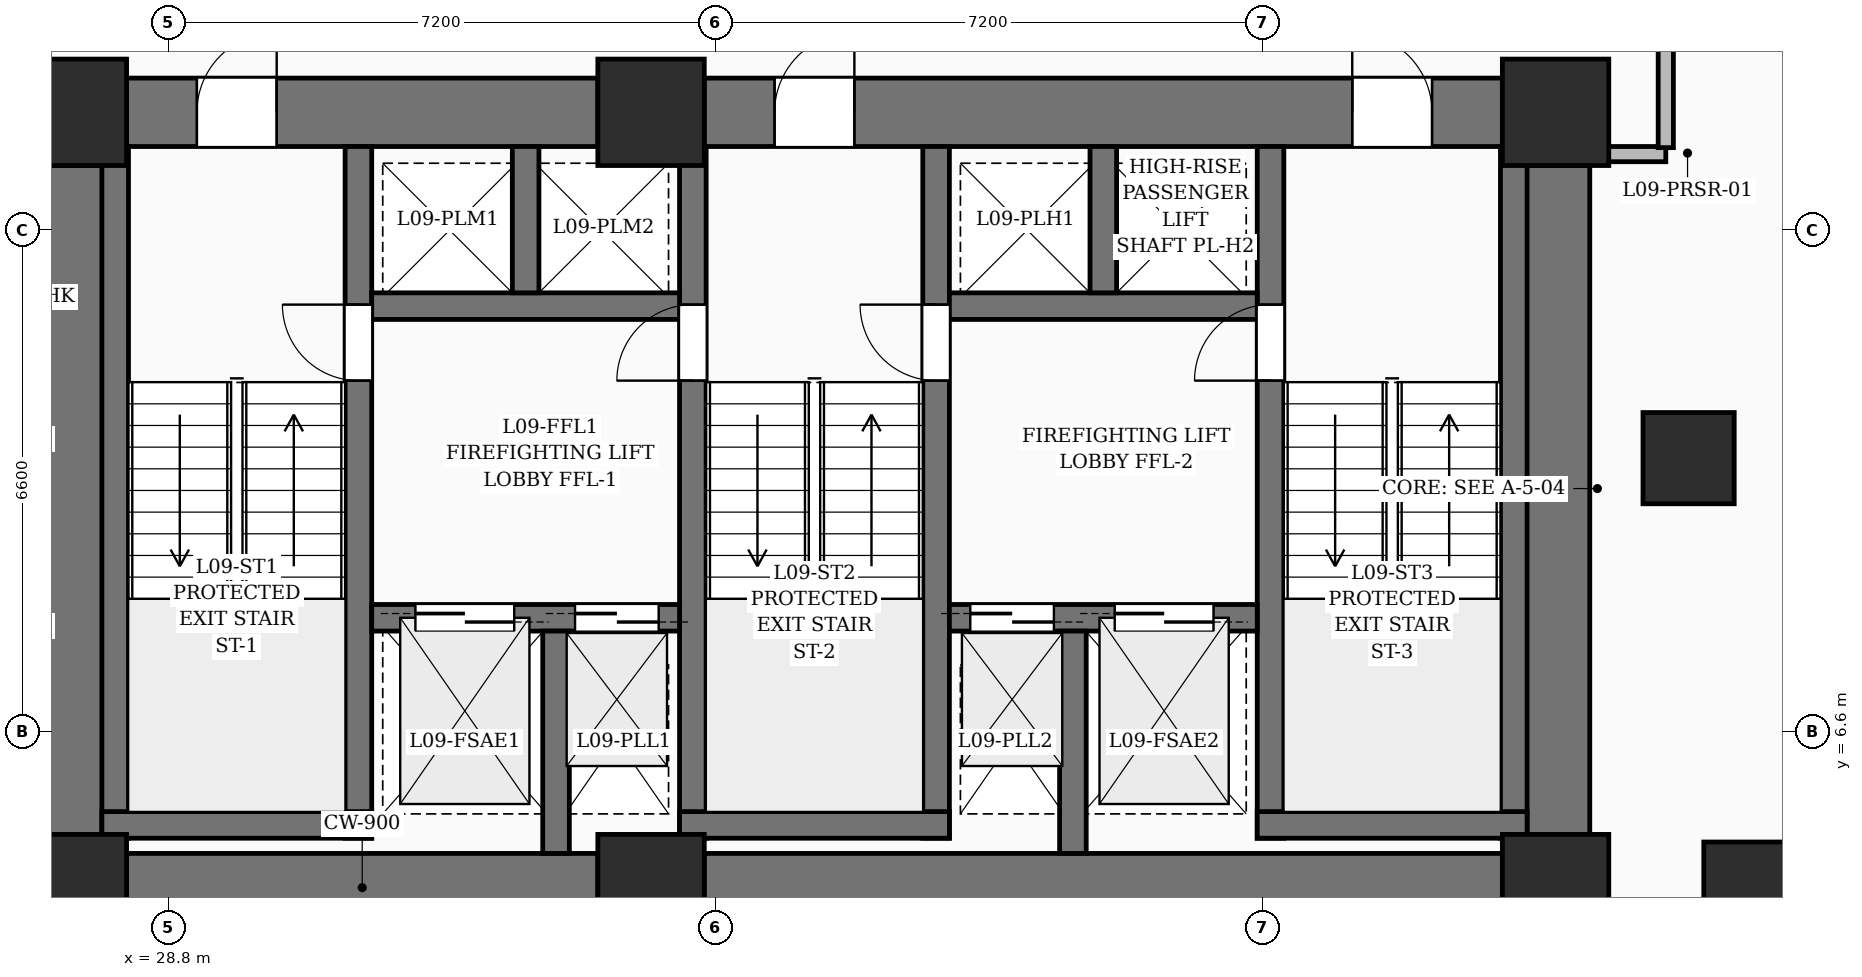
"""IFC4 building model, lengths in metres.
Left out: names, types, materials, properties, quantities, classifications, styles, units other than length and angle.
Written with IfcOpenShell. Run it as: python <this file> out.ifc"""

import sys

from ifc_helpers import new_model, si_unit, direction, frame, frame_2d, origin, origin_2d, place, context, subcontext, project, spatial, rectangle, extrude, element, fill, save


model = new_model("IFC4")
c1 = context("Model", 3, precision=1e-05, world=origin(), true_north=direction((0.0, 1.0)))
c2 = subcontext(c1, "Body", "Model", "MODEL_VIEW")
j1 = project(units=[si_unit("LENGTHUNIT", "METRE"), si_unit("PLANEANGLEUNIT", "RADIAN")], contexts=[c1])
p1 = place(None, origin())
s1 = spatial("IfcSite", under=j1, at=p1, CompositionType="ELEMENT")
p2 = place(p1, origin())
s2 = spatial("IfcBuilding", under=s1, at=p2, CompositionType="ELEMENT")
p3 = place(p2, frame((0.0, 0.0, 42.6)))
s3 = spatial("IfcBuildingStorey", under=s2, at=p3, CompositionType="ELEMENT", Elevation=42.6)
for number, where, z_axis, x_axis in (
    (1, (27.55, 4.55, 0.0), (0.0, 0.0, 1.0), (1.0, 0.0, 0.0)),
    (2, (35.15, 4.55, 0.0), (0.0, 0.0, 1.0), (1.0, 0.0, 0.0)),
    (3, (47.05, 4.55, 0.0), (0.0, 0.0, 1.0), (1.0, 0.0, 0.0)),
    (4, (27.55, 14.75, 0.0), (0.0, 0.0, 1.0), (1.0, 0.0, 0.0)),
    (5, (35.15, 14.75, 0.0), (0.0, 0.0, 1.0), (1.0, 0.0, 0.0)),
    (6, (47.05, 14.75, 0.0), (0.0, 0.0, 1.0), (1.0, 0.0, 0.0)),
):
    element("IfcColumn", number, at=place(p3, frame(where, z_axis=z_axis, x_axis=x_axis)), inside=s3, PredefinedType="COLUMN", context=c2, shape_type="SweptSolid", body=[
        extrude(rectangle(XDim=1.4, YDim=1.4, at=origin_2d()), origin(), (0.0, 0.0, 1.0), 3.6),
    ])
for number, where, z_axis, x_axis in (
    (7, (49.6, 4.55, 0.0), (0.0, 0.0, 1.0), (1.0, 0.0, 0.0)),
    (8, (48.8, 10.2, 0.0), (0.0, 0.0, 1.0), (1.0, 0.0, 0.0)),
):
    element("IfcColumn", number, at=place(p3, frame(where, z_axis=z_axis, x_axis=x_axis)), inside=s3, PredefinedType="COLUMN", context=c2, shape_type="SweptSolid", body=[
        extrude(rectangle(XDim=1.2, YDim=1.2, at=origin_2d()), origin(), (0.0, 0.0, 1.0), 3.6),
    ])
p4 = place(p3, frame((28.25, 4.55, 0.0), z_axis=(0.0, 0.0, 1.0), x_axis=(1.0, 0.0, 0.0)))
e9 = element("IfcWall", 9, at=p4, inside=s3, PredefinedType="SHEAR", context=c2, shape_type="SweptSolid", body=[
    extrude(rectangle(XDim=6.2, YDim=0.9, at=frame_2d((3.1, 0.0))), origin(), (0.0, 0.0, 1.0), 3.6),
])
p5 = place(p3, frame((35.85, 4.55, 0.0), z_axis=(0.0, 0.0, 1.0), x_axis=(1.0, 0.0, 0.0)))
e10 = element("IfcWall", 10, at=p5, inside=s3, PredefinedType="SHEAR", context=c2, shape_type="SweptSolid", body=[
    extrude(rectangle(XDim=10.5, YDim=0.9, at=frame_2d((5.25, 0.0))), origin(), (0.0, 0.0, 1.0), 3.6),
])
p6 = place(p3, frame((28.25, 14.75, 0.0), z_axis=(0.0, 0.0, 1.0), x_axis=(1.0, 0.0, 0.0)))
e11 = element("IfcWall", 11, at=p6, inside=s3, PredefinedType="SHEAR", context=c2, shape_type="SweptSolid", body=[
    extrude(rectangle(XDim=6.2, YDim=0.9, at=frame_2d((3.1, 0.0))), origin(), (0.0, 0.0, 1.0), 3.6),
])
p7 = place(p6, frame((0.925, 0.0, 0.0)))
e12 = element("IfcOpeningElement", 12, at=p7, cuts=e11, PredefinedType="OPENING", context=c2, shape_type="SweptSolid", body=[
    extrude(rectangle(XDim=1.05, YDim=2.15, at=frame_2d((0.525, 1.075))), frame((0.0, 0.46, 0.0), z_axis=(0.0, -1.0, 0.0), x_axis=(1.0, 0.0, 0.0)), (0.0, 0.0, 1.0), 0.92),
])
p8 = place(p3, frame((35.85, 14.75, 0.0), z_axis=(0.0, 0.0, 1.0), x_axis=(1.0, 0.0, 0.0)))
e13 = element("IfcWall", 13, at=p8, inside=s3, PredefinedType="SHEAR", context=c2, shape_type="SweptSolid", body=[
    extrude(rectangle(XDim=10.5, YDim=0.9, at=frame_2d((5.25, 0.0))), origin(), (0.0, 0.0, 1.0), 3.6),
])
p9 = place(p8, frame((0.925, 0.0, 0.0)))
e14 = element("IfcOpeningElement", 14, at=p9, cuts=e13, PredefinedType="OPENING", context=c2, shape_type="SweptSolid", body=[
    extrude(rectangle(XDim=1.05, YDim=2.15, at=frame_2d((0.525, 1.075))), frame((0.0, 0.46, 0.0), z_axis=(0.0, -1.0, 0.0), x_axis=(1.0, 0.0, 0.0)), (0.0, 0.0, 1.0), 0.92),
])
p10 = place(p8, frame((8.525, 0.0, 0.0)))
e15 = element("IfcOpeningElement", 15, at=p10, cuts=e13, PredefinedType="OPENING", context=c2, shape_type="SweptSolid", body=[
    extrude(rectangle(XDim=1.05, YDim=2.15, at=frame_2d((0.525, 1.075))), frame((0.0, 0.46, 0.0), z_axis=(0.0, -1.0, 0.0), x_axis=(1.0, 0.0, 0.0)), (0.0, 0.0, 1.0), 0.92),
])
for number, where, z_axis, x_axis in (
    (16, (27.55, 5.25, 0.0), (0.0, 0.0, 1.0), (0.0, 1.0, 0.0)),
    (17, (47.05, 5.25, 0.0), (0.0, 0.0, 1.0), (0.0, 1.0, 0.0)),
):
    element("IfcWall", number, at=place(p3, frame(where, z_axis=z_axis, x_axis=x_axis)), inside=s3, PredefinedType="SHEAR", context=c2, shape_type="SweptSolid", body=[
        extrude(rectangle(XDim=8.8, YDim=0.9, at=frame_2d((4.4, 0.0))), origin(), (0.0, 0.0, 1.0), 3.6),
    ])
p11 = place(p3, frame((28.1, 5.2, 0.0), z_axis=(0.0, 0.0, 1.0), x_axis=(0.0, 1.0, 0.0)))
e18 = element("IfcWall", 18, at=p11, inside=s3, PredefinedType="SOLIDWALL", context=c2, shape_type="SweptSolid", body=[
    extrude(rectangle(XDim=9.1, YDim=0.35, at=frame_2d((4.55, 0.0))), origin(), (0.0, 0.0, 1.0), 3.6),
])
p12 = place(p3, frame((31.3, 5.2, 0.0), z_axis=(0.0, 0.0, 1.0), x_axis=(0.0, 1.0, 0.0)))
e19 = element("IfcWall", 19, at=p12, inside=s3, PredefinedType="SOLIDWALL", context=c2, shape_type="SweptSolid", body=[
    extrude(rectangle(XDim=9.1, YDim=0.35, at=frame_2d((4.55, 0.0))), origin(), (0.0, 0.0, 1.0), 3.6),
])
p13 = place(p12, frame((6.02, 0.0, 0.0)))
e20 = element("IfcOpeningElement", 20, at=p13, cuts=e19, PredefinedType="OPENING", context=c2, shape_type="SweptSolid", body=[
    extrude(rectangle(XDim=1.0, YDim=2.15, at=frame_2d((0.5, 1.075))), frame((0.0, 0.185, 0.0), z_axis=(0.0, -1.0, 0.0), x_axis=(1.0, 0.0, 0.0)), (0.0, 0.0, 1.0), 0.37),
])
p14 = place(p3, frame((27.925, 5.375, 0.0), z_axis=(0.0, 0.0, 1.0), x_axis=(1.0, 0.0, 0.0)))
e21 = element("IfcWall", 21, at=p14, inside=s3, PredefinedType="SOLIDWALL", context=c2, shape_type="SweptSolid", body=[
    extrude(rectangle(XDim=3.55, YDim=0.35, at=frame_2d((1.775, 0.0))), origin(), (0.0, 0.0, 1.0), 3.6),
])
p15 = place(p3, frame((35.7, 5.2, 0.0), z_axis=(0.0, 0.0, 1.0), x_axis=(0.0, 1.0, 0.0)))
e22 = element("IfcWall", 22, at=p15, inside=s3, PredefinedType="SOLIDWALL", context=c2, shape_type="SweptSolid", body=[
    extrude(rectangle(XDim=9.1, YDim=0.35, at=frame_2d((4.55, 0.0))), origin(), (0.0, 0.0, 1.0), 3.6),
])
p16 = place(p15, frame((6.02, 0.0, 0.0)))
e23 = element("IfcOpeningElement", 23, at=p16, cuts=e22, PredefinedType="OPENING", context=c2, shape_type="SweptSolid", body=[
    extrude(rectangle(XDim=1.0, YDim=2.15, at=frame_2d((0.5, 1.075))), frame((0.0, 0.185, 0.0), z_axis=(0.0, -1.0, 0.0), x_axis=(1.0, 0.0, 0.0)), (0.0, 0.0, 1.0), 0.37),
])
p17 = place(p3, frame((38.9, 5.2, 0.0), z_axis=(0.0, 0.0, 1.0), x_axis=(0.0, 1.0, 0.0)))
e24 = element("IfcWall", 24, at=p17, inside=s3, PredefinedType="SOLIDWALL", context=c2, shape_type="SweptSolid", body=[
    extrude(rectangle(XDim=9.1, YDim=0.35, at=frame_2d((4.55, 0.0))), origin(), (0.0, 0.0, 1.0), 3.6),
])
p18 = place(p17, frame((6.02, 0.0, 0.0)))
e25 = element("IfcOpeningElement", 25, at=p18, cuts=e24, PredefinedType="OPENING", context=c2, shape_type="SweptSolid", body=[
    extrude(rectangle(XDim=1.0, YDim=2.15, at=frame_2d((0.5, 1.075))), frame((0.0, 0.185, 0.0), z_axis=(0.0, -1.0, 0.0), x_axis=(1.0, 0.0, 0.0)), (0.0, 0.0, 1.0), 0.37),
])
p19 = place(p3, frame((35.525, 5.375, 0.0), z_axis=(0.0, 0.0, 1.0), x_axis=(1.0, 0.0, 0.0)))
e26 = element("IfcWall", 26, at=p19, inside=s3, PredefinedType="SOLIDWALL", context=c2, shape_type="SweptSolid", body=[
    extrude(rectangle(XDim=3.55, YDim=0.35, at=frame_2d((1.775, 0.0))), origin(), (0.0, 0.0, 1.0), 3.6),
])
p20 = place(p3, frame((43.3, 5.2, 0.0), z_axis=(0.0, 0.0, 1.0), x_axis=(0.0, 1.0, 0.0)))
e27 = element("IfcWall", 27, at=p20, inside=s3, PredefinedType="SOLIDWALL", context=c2, shape_type="SweptSolid", body=[
    extrude(rectangle(XDim=9.1, YDim=0.35, at=frame_2d((4.55, 0.0))), origin(), (0.0, 0.0, 1.0), 3.6),
])
p21 = place(p20, frame((6.02, 0.0, 0.0)))
e28 = element("IfcOpeningElement", 28, at=p21, cuts=e27, PredefinedType="OPENING", context=c2, shape_type="SweptSolid", body=[
    extrude(rectangle(XDim=1.0, YDim=2.15, at=frame_2d((0.5, 1.075))), frame((0.0, 0.185, 0.0), z_axis=(0.0, -1.0, 0.0), x_axis=(1.0, 0.0, 0.0)), (0.0, 0.0, 1.0), 0.37),
])
p22 = place(p3, frame((46.5, 5.2, 0.0), z_axis=(0.0, 0.0, 1.0), x_axis=(0.0, 1.0, 0.0)))
e29 = element("IfcWall", 29, at=p22, inside=s3, PredefinedType="SOLIDWALL", context=c2, shape_type="SweptSolid", body=[
    extrude(rectangle(XDim=9.1, YDim=0.35, at=frame_2d((4.55, 0.0))), origin(), (0.0, 0.0, 1.0), 3.6),
])
p23 = place(p3, frame((43.125, 5.375, 0.0), z_axis=(0.0, 0.0, 1.0), x_axis=(1.0, 0.0, 0.0)))
e30 = element("IfcWall", 30, at=p23, inside=s3, PredefinedType="SOLIDWALL", context=c2, shape_type="SweptSolid", body=[
    extrude(rectangle(XDim=3.55, YDim=0.35, at=frame_2d((1.775, 0.0))), origin(), (0.0, 0.0, 1.0), 3.6),
])
p24 = place(p3, frame((31.475, 8.1, 0.0), z_axis=(0.0, 0.0, 1.0), x_axis=(1.0, 0.0, 0.0)))
e31 = element("IfcWall", 31, at=p24, inside=s3, PredefinedType="SOLIDWALL", context=c2, shape_type="SweptSolid", body=[
    extrude(rectangle(XDim=4.05, YDim=0.35, at=frame_2d((2.025, 0.0))), origin(), (0.0, 0.0, 1.0), 3.6),
])
p25 = place(p24, frame((0.575, 0.0, 0.0)))
e32 = element("IfcOpeningElement", 32, at=p25, cuts=e31, PredefinedType="OPENING", context=c2, shape_type="SweptSolid", body=[
    extrude(rectangle(XDim=1.3, YDim=2.25, at=frame_2d((0.65, 1.125))), frame((0.0, 0.185, 0.0), z_axis=(0.0, -1.0, 0.0), x_axis=(1.0, 0.0, 0.0)), (0.0, 0.0, 1.0), 0.37),
])
p26 = place(p24, frame((2.675, 0.0, 0.0)))
e33 = element("IfcOpeningElement", 33, at=p26, cuts=e31, PredefinedType="OPENING", context=c2, shape_type="SweptSolid", body=[
    extrude(rectangle(XDim=1.1, YDim=2.2, at=frame_2d((0.55, 1.1))), frame((0.0, 0.185, 0.0), z_axis=(0.0, -1.0, 0.0), x_axis=(1.0, 0.0, 0.0)), (0.0, 0.0, 1.0), 0.37),
])
p27 = place(p3, frame((39.075, 8.1, 0.0), z_axis=(0.0, 0.0, 1.0), x_axis=(1.0, 0.0, 0.0)))
e34 = element("IfcWall", 34, at=p27, inside=s3, PredefinedType="SOLIDWALL", context=c2, shape_type="SweptSolid", body=[
    extrude(rectangle(XDim=4.05, YDim=0.35, at=frame_2d((2.025, 0.0))), origin(), (0.0, 0.0, 1.0), 3.6),
])
p28 = place(p27, frame((2.175, 0.0, 0.0)))
e35 = element("IfcOpeningElement", 35, at=p28, cuts=e34, PredefinedType="OPENING", context=c2, shape_type="SweptSolid", body=[
    extrude(rectangle(XDim=1.3, YDim=2.25, at=frame_2d((0.65, 1.125))), frame((0.0, 0.185, 0.0), z_axis=(0.0, -1.0, 0.0), x_axis=(1.0, 0.0, 0.0)), (0.0, 0.0, 1.0), 0.37),
])
p29 = place(p27, frame((0.275, 0.0, 0.0)))
e36 = element("IfcOpeningElement", 36, at=p29, cuts=e34, PredefinedType="OPENING", context=c2, shape_type="SweptSolid", body=[
    extrude(rectangle(XDim=1.1, YDim=2.2, at=frame_2d((0.55, 1.1))), frame((0.0, 0.185, 0.0), z_axis=(0.0, -1.0, 0.0), x_axis=(1.0, 0.0, 0.0)), (0.0, 0.0, 1.0), 0.37),
])
for number, where, z_axis, x_axis in (
    (37, (33.9, 5.0, 0.0), (0.0, 0.0, 1.0), (0.0, 1.0, 0.0)),
    (38, (40.7, 5.0, 0.0), (0.0, 0.0, 1.0), (0.0, 1.0, 0.0)),
):
    element("IfcWall", number, at=place(p3, frame(where, z_axis=z_axis, x_axis=x_axis)), inside=s3, PredefinedType="SOLIDWALL", context=c2, shape_type="SweptSolid", body=[
        extrude(rectangle(XDim=2.925, YDim=0.35, at=frame_2d((1.462, 0.0))), origin(), (0.0, 0.0, 1.0), 3.6),
    ])
p30 = place(p3, frame((31.475, 12.2, 0.0), z_axis=(0.0, 0.0, 1.0), x_axis=(1.0, 0.0, 0.0)))
e39 = element("IfcWall", 39, at=p30, inside=s3, PredefinedType="SOLIDWALL", context=c2, shape_type="SweptSolid", body=[
    extrude(rectangle(XDim=4.05, YDim=0.35, at=frame_2d((2.025, 0.0))), origin(), (0.0, 0.0, 1.0), 3.6),
])
p31 = place(p3, frame((33.5, 12.375, 0.0), z_axis=(0.0, 0.0, 1.0), x_axis=(0.0, 1.0, 0.0)))
e40 = element("IfcWall", 40, at=p31, inside=s3, PredefinedType="SOLIDWALL", context=c2, shape_type="SweptSolid", body=[
    extrude(rectangle(XDim=1.925, YDim=0.35, at=frame_2d((0.962, 0.0))), origin(), (0.0, 0.0, 1.0), 3.6),
])
p32 = place(p3, frame((39.075, 12.2, 0.0), z_axis=(0.0, 0.0, 1.0), x_axis=(1.0, 0.0, 0.0)))
e41 = element("IfcWall", 41, at=p32, inside=s3, PredefinedType="SOLIDWALL", context=c2, shape_type="SweptSolid", body=[
    extrude(rectangle(XDim=4.05, YDim=0.35, at=frame_2d((2.025, 0.0))), origin(), (0.0, 0.0, 1.0), 3.6),
])
p33 = place(p3, frame((41.1, 12.375, 0.0), z_axis=(0.0, 0.0, 1.0), x_axis=(0.0, 1.0, 0.0)))
e42 = element("IfcWall", 42, at=p33, inside=s3, PredefinedType="SOLIDWALL", context=c2, shape_type="SweptSolid", body=[
    extrude(rectangle(XDim=1.925, YDim=0.35, at=frame_2d((0.962, 0.0))), origin(), (0.0, 0.0, 1.0), 3.6),
])
p34 = place(p3, frame((47.5, 14.2, 0.0), z_axis=(0.0, 0.0, 1.0), x_axis=(1.0, 0.0, 0.0)))
e43 = element("IfcWall", 43, at=p34, inside=s3, PredefinedType="PARTITIONING", context=c2, shape_type="SweptSolid", body=[
    extrude(rectangle(XDim=1.0, YDim=0.2, at=frame_2d((0.5, 0.0))), origin(), (0.0, 0.0, 1.0), 3.35),
])
p35 = place(p3, frame((48.5, 14.285, 0.0), z_axis=(0.0, 0.0, 1.0), x_axis=(0.0, 1.0, 0.0)))
e44 = element("IfcWall", 44, at=p35, inside=s3, PredefinedType="PARTITIONING", context=c2, shape_type="SweptSolid", body=[
    extrude(rectangle(XDim=1.315, YDim=0.2, at=frame_2d((0.658, 0.0))), origin(), (0.0, 0.0, 1.0), 3.35),
])
p36 = place(p7, origin())
e45 = element("IfcDoor", 45, at=p36, inside=s3, OperationType="SINGLE_SWING_RIGHT", PredefinedType="DOOR", context=c2, shape_type="SweptSolid", body=[
    extrude(rectangle(XDim=1.05, YDim=2.15, at=frame_2d((0.525, 1.075))), frame((0.0, 0.025, 0.0), z_axis=(0.0, -1.0, 0.0), x_axis=(1.0, 0.0, 0.0)), (0.0, 0.0, 1.0), 0.05),
])
fill(e12, e45)
p37 = place(p9, origin())
e46 = element("IfcDoor", 46, at=p37, inside=s3, OperationType="SINGLE_SWING_RIGHT", PredefinedType="DOOR", context=c2, shape_type="SweptSolid", body=[
    extrude(rectangle(XDim=1.05, YDim=2.15, at=frame_2d((0.525, 1.075))), frame((0.0, 0.025, 0.0), z_axis=(0.0, -1.0, 0.0), x_axis=(1.0, 0.0, 0.0)), (0.0, 0.0, 1.0), 0.05),
])
fill(e14, e46)
p38 = place(p10, origin())
e47 = element("IfcDoor", 47, at=p38, inside=s3, OperationType="SINGLE_SWING_LEFT", PredefinedType="DOOR", context=c2, shape_type="SweptSolid", body=[
    extrude(rectangle(XDim=1.05, YDim=2.15, at=frame_2d((0.525, 1.075))), frame((0.0, 0.025, 0.0), z_axis=(0.0, -1.0, 0.0), x_axis=(1.0, 0.0, 0.0)), (0.0, 0.0, 1.0), 0.05),
])
fill(e15, e47)
p39 = place(p13, origin())
e48 = element("IfcDoor", 48, at=p39, inside=s3, OperationType="SINGLE_SWING_RIGHT", PredefinedType="DOOR", context=c2, shape_type="SweptSolid", body=[
    extrude(rectangle(XDim=1.0, YDim=2.15, at=frame_2d((0.5, 1.075))), frame((0.0, 0.025, 0.0), z_axis=(0.0, -1.0, 0.0), x_axis=(1.0, 0.0, 0.0)), (0.0, 0.0, 1.0), 0.05),
])
fill(e20, e48)
p40 = place(p16, origin())
e49 = element("IfcDoor", 49, at=p40, inside=s3, OperationType="SINGLE_SWING_LEFT", PredefinedType="DOOR", context=c2, shape_type="SweptSolid", body=[
    extrude(rectangle(XDim=1.0, YDim=2.15, at=frame_2d((0.5, 1.075))), frame((0.0, 0.025, 0.0), z_axis=(0.0, -1.0, 0.0), x_axis=(1.0, 0.0, 0.0)), (0.0, 0.0, 1.0), 0.05),
])
fill(e23, e49)
p41 = place(p18, origin())
e50 = element("IfcDoor", 50, at=p41, inside=s3, OperationType="SINGLE_SWING_RIGHT", PredefinedType="DOOR", context=c2, shape_type="SweptSolid", body=[
    extrude(rectangle(XDim=1.0, YDim=2.15, at=frame_2d((0.5, 1.075))), frame((0.0, 0.025, 0.0), z_axis=(0.0, -1.0, 0.0), x_axis=(1.0, 0.0, 0.0)), (0.0, 0.0, 1.0), 0.05),
])
fill(e25, e50)
p42 = place(p21, origin())
e51 = element("IfcDoor", 51, at=p42, inside=s3, OperationType="SINGLE_SWING_LEFT", PredefinedType="DOOR", context=c2, shape_type="SweptSolid", body=[
    extrude(rectangle(XDim=1.0, YDim=2.15, at=frame_2d((0.5, 1.075))), frame((0.0, 0.025, 0.0), z_axis=(0.0, -1.0, 0.0), x_axis=(1.0, 0.0, 0.0)), (0.0, 0.0, 1.0), 0.05),
])
fill(e28, e51)
p43 = place(p25, origin())
e52 = element("IfcDoor", 52, at=p43, inside=s3, OperationType="DOUBLE_DOOR_SLIDING", PredefinedType="DOOR", context=c2, shape_type="SweptSolid", body=[
    extrude(rectangle(XDim=1.3, YDim=2.25, at=frame_2d((0.65, 1.125))), frame((0.0, 0.025, 0.0), z_axis=(0.0, -1.0, 0.0), x_axis=(1.0, 0.0, 0.0)), (0.0, 0.0, 1.0), 0.05),
])
fill(e32, e52)
p44 = place(p28, origin())
e53 = element("IfcDoor", 53, at=p44, inside=s3, OperationType="DOUBLE_DOOR_SLIDING", PredefinedType="DOOR", context=c2, shape_type="SweptSolid", body=[
    extrude(rectangle(XDim=1.3, YDim=2.25, at=frame_2d((0.65, 1.125))), frame((0.0, 0.025, 0.0), z_axis=(0.0, -1.0, 0.0), x_axis=(1.0, 0.0, 0.0)), (0.0, 0.0, 1.0), 0.05),
])
fill(e35, e53)
p45 = place(p26, origin())
e54 = element("IfcDoor", 54, at=p45, inside=s3, OperationType="DOUBLE_DOOR_SLIDING", PredefinedType="DOOR", context=c2, shape_type="SweptSolid", body=[
    extrude(rectangle(XDim=1.1, YDim=2.2, at=frame_2d((0.55, 1.1))), frame((0.0, 0.025, 0.0), z_axis=(0.0, -1.0, 0.0), x_axis=(1.0, 0.0, 0.0)), (0.0, 0.0, 1.0), 0.05),
])
fill(e33, e54)
p46 = place(p29, origin())
e55 = element("IfcDoor", 55, at=p46, inside=s3, OperationType="DOUBLE_DOOR_SLIDING", PredefinedType="DOOR", context=c2, shape_type="SweptSolid", body=[
    extrude(rectangle(XDim=1.1, YDim=2.2, at=frame_2d((0.55, 1.1))), frame((0.0, 0.025, 0.0), z_axis=(0.0, -1.0, 0.0), x_axis=(1.0, 0.0, 0.0)), (0.0, 0.0, 1.0), 0.05),
])
fill(e36, e55)
save(model, sys.argv[1])
